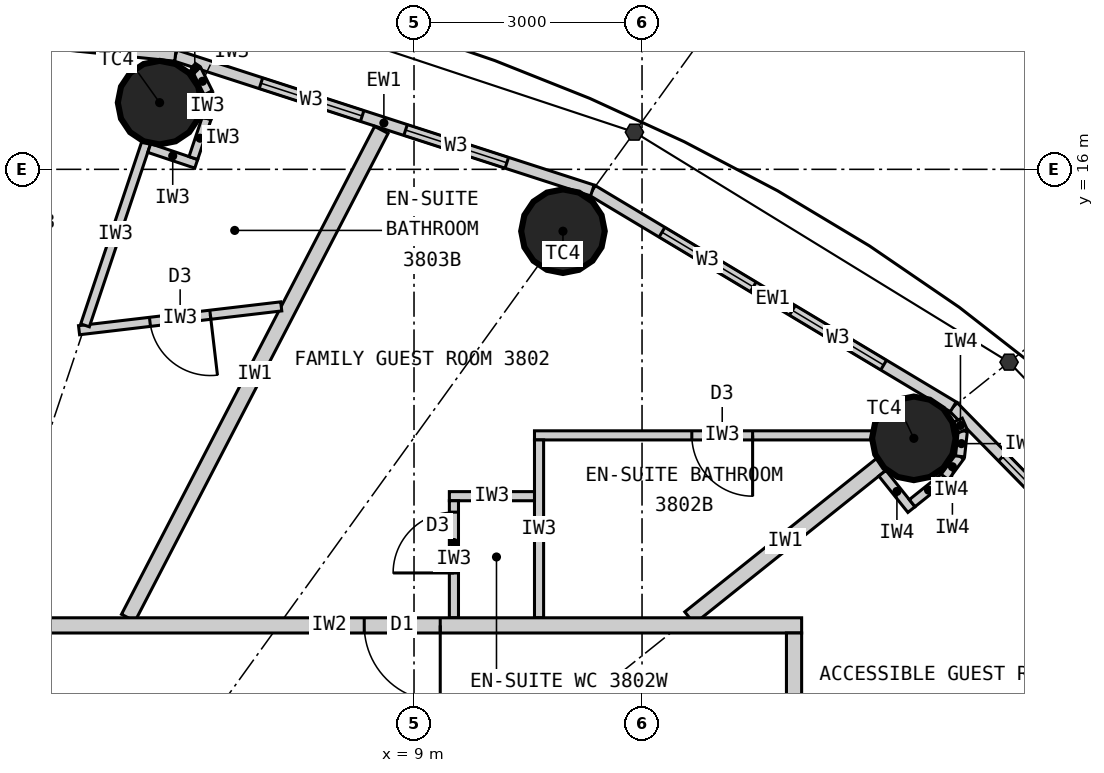
"""IFC4 building model, lengths in metres.
Left out: names, types, materials, properties, quantities, classifications, styles, units other than length and angle.
Written with IfcOpenShell. Run it as: python <this file> out.ifc"""

import sys

from ifc_helpers import new_model, si_unit, direction, frame, frame_2d, origin, origin_2d, place, context, subcontext, project, spatial, rectangle, circle, extrude, element, fill, save


model = new_model("IFC4")
c1 = context("Model", 3, precision=1e-05, world=origin(), true_north=direction((0.0, 1.0)))
c2 = subcontext(c1, "Body", "Model", "MODEL_VIEW")
j1 = project(units=[si_unit("LENGTHUNIT", "METRE"), si_unit("PLANEANGLEUNIT", "RADIAN")], contexts=[c1])
p1 = place(None, origin())
s1 = spatial("IfcSite", under=j1, at=p1, CompositionType="ELEMENT")
p2 = place(p1, origin())
s2 = spatial("IfcBuilding", under=s1, at=p2, CompositionType="ELEMENT")
p3 = place(p2, frame((0.0, 0.0, 146.7)))
s3 = spatial("IfcBuildingStorey", under=s2, at=p3, CompositionType="ELEMENT", Elevation=146.7)
for number, where, z_axis, x_axis in (
    (1, (15.576, 12.461, 0.0), (0.0, 0.0, 1.0), (1.0, 0.0, 0.0)),
    (2, (10.96, 15.186, 0.0), (0.0, 0.0, 1.0), (1.0, 0.0, 0.0)),
    (3, (5.653, 16.877, 0.0), (0.0, 0.0, 1.0), (1.0, 0.0, 0.0)),
):
    element("IfcColumn", number, at=place(p3, frame(where, z_axis=z_axis, x_axis=x_axis)), inside=s3, PredefinedType="COLUMN", context=c2, shape_type="SweptSolid", body=[
        extrude(circle(Radius=0.55, at=origin_2d()), origin(), (0.0, 0.0, 1.0), 3.3),
    ])
p4 = place(p3, frame((19.772, 9.132, 0.0), z_axis=(0.0, 0.0, 1.0), x_axis=(-0.700727467776, 0.71342905457, 0.0)))
e4 = element("IfcWall", 4, at=p4, inside=s3, PredefinedType="ELEMENTEDWALL", context=c2, shape_type="SweptSolid", body=[
    extrude(rectangle(XDim=5.247, YDim=0.15, at=frame_2d((2.624, 0.0))), origin(), (0.0, 0.0, 1.0), 3.12),
])
p5 = place(p4, frame((0.924, 0.0, 0.9)))
e5 = element("IfcOpeningElement", 5, at=p5, cuts=e4, PredefinedType="OPENING", context=c2, shape_type="SweptSolid", body=[
    extrude(rectangle(XDim=1.4, YDim=1.9, at=frame_2d((0.7, 0.95))), frame((0.0, 0.085, 0.0), z_axis=(0.0, -1.0, 0.0), x_axis=(1.0, 0.0, 0.0)), (0.0, 0.0, 1.0), 0.17),
])
p6 = place(p4, frame((2.924, 0.0, 0.9)))
e6 = element("IfcOpeningElement", 6, at=p6, cuts=e4, PredefinedType="OPENING", context=c2, shape_type="SweptSolid", body=[
    extrude(rectangle(XDim=1.4, YDim=1.9, at=frame_2d((0.7, 0.95))), frame((0.0, 0.085, 0.0), z_axis=(0.0, -1.0, 0.0), x_axis=(1.0, 0.0, 0.0)), (0.0, 0.0, 1.0), 0.17),
])
p7 = place(p3, frame((16.095, 12.876, 0.0), z_axis=(0.0, 0.0, 1.0), x_axis=(-0.857695199231, 0.514158482587, 0.0)))
e7 = element("IfcWall", 7, at=p7, inside=s3, PredefinedType="ELEMENTEDWALL", context=c2, shape_type="SweptSolid", body=[
    extrude(rectangle(XDim=5.536, YDim=0.15, at=frame_2d((2.768, 0.0))), origin(), (0.0, 0.0, 1.0), 3.12),
])
p8 = place(p7, frame((1.068, 0.0, 0.9)))
e8 = element("IfcOpeningElement", 8, at=p8, cuts=e7, PredefinedType="OPENING", context=c2, shape_type="SweptSolid", body=[
    extrude(rectangle(XDim=1.4, YDim=1.9, at=frame_2d((0.7, 0.95))), frame((0.0, 0.085, 0.0), z_axis=(0.0, -1.0, 0.0), x_axis=(1.0, 0.0, 0.0)), (0.0, 0.0, 1.0), 0.17),
])
p9 = place(p7, frame((3.068, 0.0, 0.9)))
e9 = element("IfcOpeningElement", 9, at=p9, cuts=e7, PredefinedType="OPENING", context=c2, shape_type="SweptSolid", body=[
    extrude(rectangle(XDim=1.4, YDim=1.9, at=frame_2d((0.7, 0.95))), frame((0.0, 0.085, 0.0), z_axis=(0.0, -1.0, 0.0), x_axis=(1.0, 0.0, 0.0)), (0.0, 0.0, 1.0), 0.17),
])
p10 = place(p3, frame((11.346, 15.722, 0.0), z_axis=(0.0, 0.0, 1.0), x_axis=(-0.951432482129, 0.307857486429, 0.0)))
e10 = element("IfcWall", 10, at=p10, inside=s3, PredefinedType="ELEMENTEDWALL", context=c2, shape_type="SweptSolid", body=[
    extrude(rectangle(XDim=5.766, YDim=0.15, at=frame_2d((2.883, 0.0))), origin(), (0.0, 0.0, 1.0), 3.12),
])
p11 = place(p10, frame((1.183, 0.0, 0.9)))
e11 = element("IfcOpeningElement", 11, at=p11, cuts=e10, PredefinedType="OPENING", context=c2, shape_type="SweptSolid", body=[
    extrude(rectangle(XDim=1.4, YDim=1.9, at=frame_2d((0.7, 0.95))), frame((0.0, 0.085, 0.0), z_axis=(0.0, -1.0, 0.0), x_axis=(1.0, 0.0, 0.0)), (0.0, 0.0, 1.0), 0.17),
])
p12 = place(p10, frame((3.183, 0.0, 0.9)))
e12 = element("IfcOpeningElement", 12, at=p12, cuts=e10, PredefinedType="OPENING", context=c2, shape_type="SweptSolid", body=[
    extrude(rectangle(XDim=1.4, YDim=1.9, at=frame_2d((0.7, 0.95))), frame((0.0, 0.085, 0.0), z_axis=(0.0, -1.0, 0.0), x_axis=(1.0, 0.0, 0.0)), (0.0, 0.0, 1.0), 0.17),
])
p13 = place(p3, frame((5.86, 17.497, 0.0), z_axis=(0.0, 0.0, 1.0), x_axis=(-0.994751738032, 0.102318032045, 0.0)))
e13 = element("IfcWall", 13, at=p13, inside=s3, PredefinedType="ELEMENTEDWALL", context=c2, shape_type="SweptSolid", body=[
    extrude(rectangle(XDim=5.891, YDim=0.15, at=frame_2d((2.946, 0.0))), origin(), (0.0, 0.0, 1.0), 3.12),
])
p14 = place(p13, frame((1.246, 0.0, 0.9)))
e14 = element("IfcOpeningElement", 14, at=p14, cuts=e13, PredefinedType="OPENING", context=c2, shape_type="SweptSolid", body=[
    extrude(rectangle(XDim=1.4, YDim=1.9, at=frame_2d((0.7, 0.95))), frame((0.0, 0.085, 0.0), z_axis=(0.0, -1.0, 0.0), x_axis=(1.0, 0.0, 0.0)), (0.0, 0.0, 1.0), 0.17),
])
p15 = place(p13, frame((3.246, 0.0, 0.9)))
e15 = element("IfcOpeningElement", 15, at=p15, cuts=e13, PredefinedType="OPENING", context=c2, shape_type="SweptSolid", body=[
    extrude(rectangle(XDim=1.4, YDim=1.9, at=frame_2d((0.7, 0.95))), frame((0.0, 0.085, 0.0), z_axis=(0.0, -1.0, 0.0), x_axis=(1.0, 0.0, 0.0)), (0.0, 0.0, 1.0), 0.17),
])
p16 = place(p3, frame((12.625, 10.1, 0.0), z_axis=(0.0, 0.0, 1.0), x_axis=(0.780876185034, 0.624685827954, 0.0)))
e16 = element("IfcWall", 16, at=p16, inside=s3, PredefinedType="PARTITIONING", context=c2, shape_type="SweptSolid", body=[
    extrude(rectangle(XDim=3.229, YDim=0.2, at=frame_2d((1.615, 0.0))), origin(), (0.0, 0.0, 1.0), 2.42),
])
p17 = place(p3, frame((5.24, 10.1, 0.0), z_axis=(0.0, 0.0, 1.0), x_axis=(0.460532965373, 0.887642601391, 0.0)))
e17 = element("IfcWall", 17, at=p17, inside=s3, PredefinedType="PARTITIONING", context=c2, shape_type="SweptSolid", body=[
    extrude(rectangle(XDim=7.231, YDim=0.2, at=frame_2d((3.616, 0.0))), origin(), (0.0, 0.0, 1.0), 3.12),
])
p18 = place(p3, frame((15.525, 12.5, 0.0), z_axis=(0.0, 0.0, 1.0), x_axis=(-1.0, 0.0, 0.0)))
e18 = element("IfcWall", 18, at=p18, inside=s3, PredefinedType="PARTITIONING", context=c2, shape_type="SweptSolid", body=[
    extrude(rectangle(XDim=4.94, YDim=0.12, at=frame_2d((2.47, 0.0))), origin(), (0.0, 0.0, 1.0), 3.12),
])
p19 = place(p18, frame((2.07, 0.0, 0.0)))
e19 = element("IfcOpeningElement", 19, at=p19, cuts=e18, PredefinedType="OPENING", context=c2, shape_type="SweptSolid", body=[
    extrude(rectangle(XDim=0.8, YDim=2.1, at=frame_2d((0.4, 1.05))), frame((0.0, 0.07, 0.0), z_axis=(0.0, -1.0, 0.0), x_axis=(1.0, 0.0, 0.0)), (0.0, 0.0, 1.0), 0.14),
])
p20 = place(p3, frame((10.645, 10.1, 0.0), z_axis=(0.0, 0.0, 1.0), x_axis=(0.0, 1.0, 0.0)))
e20 = element("IfcWall", 20, at=p20, inside=s3, PredefinedType="PARTITIONING", context=c2, shape_type="SweptSolid", body=[
    extrude(rectangle(XDim=2.34, YDim=0.12, at=frame_2d((1.17, 0.0))), origin(), (0.0, 0.0, 1.0), 3.12),
])
p21 = place(p3, frame((10.585, 11.7, 0.0), z_axis=(0.0, 0.0, 1.0), x_axis=(-1.0, 0.0, 0.0)))
e21 = element("IfcWall", 21, at=p21, inside=s3, PredefinedType="PARTITIONING", context=c2, shape_type="SweptSolid", body=[
    extrude(rectangle(XDim=1.12, YDim=0.12, at=frame_2d((0.56, 0.0))), origin(), (0.0, 0.0, 1.0), 3.12),
])
p22 = place(p3, frame((9.525, 10.1, 0.0), z_axis=(0.0, 0.0, 1.0), x_axis=(0.0, 1.0, 0.0)))
e22 = element("IfcWall", 22, at=p22, inside=s3, PredefinedType="PARTITIONING", context=c2, shape_type="SweptSolid", body=[
    extrude(rectangle(XDim=1.54, YDim=0.12, at=frame_2d((0.77, 0.0))), origin(), (0.0, 0.0, 1.0), 3.12),
])
p23 = place(p22, frame((0.59, 0.0, 0.0)))
e23 = element("IfcOpeningElement", 23, at=p23, cuts=e22, PredefinedType="OPENING", context=c2, shape_type="SweptSolid", body=[
    extrude(rectangle(XDim=0.8, YDim=2.1, at=frame_2d((0.4, 1.05))), frame((0.0, 0.07, 0.0), z_axis=(0.0, -1.0, 0.0), x_axis=(1.0, 0.0, 0.0)), (0.0, 0.0, 1.0), 0.14),
])
p24 = place(p3, frame((7.253, 14.197, 0.0), z_axis=(0.0, 0.0, 1.0), x_axis=(-0.993128188393, -0.117031625725, 0.0)))
e24 = element("IfcWall", 24, at=p24, inside=s3, PredefinedType="PARTITIONING", context=c2, shape_type="SweptSolid", body=[
    extrude(rectangle(XDim=2.678, YDim=0.12, at=frame_2d((1.339, 0.0))), origin(), (0.0, 0.0, 1.0), 3.12),
])
p25 = place(p24, frame((0.939, 0.0, 0.0)))
e25 = element("IfcOpeningElement", 25, at=p25, cuts=e24, PredefinedType="OPENING", context=c2, shape_type="SweptSolid", body=[
    extrude(rectangle(XDim=0.8, YDim=2.1, at=frame_2d((0.4, 1.05))), frame((0.0, 0.07, 0.0), z_axis=(0.0, -1.0, 0.0), x_axis=(1.0, 0.0, 0.0)), (0.0, 0.0, 1.0), 0.14),
])
p26 = place(p3, frame((4.671, 13.948, 0.0), z_axis=(0.0, 0.0, 1.0), x_axis=(0.317669167093, 0.948201613729, 0.0)))
e26 = element("IfcWall", 26, at=p26, inside=s3, PredefinedType="PARTITIONING", context=c2, shape_type="SweptSolid", body=[
    extrude(rectangle(XDim=2.54, YDim=0.12, at=frame_2d((1.27, 0.0))), origin(), (0.0, 0.0, 1.0), 2.42),
])
p27 = place(p3, frame((5.516, 16.28, 0.0), z_axis=(0.0, 0.0, 1.0), x_axis=(0.948157944392, -0.317799484717, 0.0)))
e27 = element("IfcWall", 27, at=p27, inside=s3, PredefinedType="PARTITIONING", context=c2, shape_type="SweptSolid", body=[
    extrude(rectangle(XDim=0.652, YDim=0.12, at=frame_2d((0.326, 0.0))), origin(), (0.0, 0.0, 1.0), 3.12),
])
p28 = place(p3, frame((6.097, 16.149, 0.0), z_axis=(0.0, 0.0, 1.0), x_axis=(0.317292604854, 0.948327687514, 0.0)))
e28 = element("IfcWall", 28, at=p28, inside=s3, PredefinedType="PARTITIONING", context=c2, shape_type="SweptSolid", body=[
    extrude(rectangle(XDim=0.55, YDim=0.12, at=frame_2d((0.275, 0.0))), origin(), (0.0, 0.0, 1.0), 3.12),
])
for number, where, z_axis, x_axis in (
    (29, (6.271, 16.67, 0.0), (0.0, 0.0, 1.0), (0.061, 0.998, 0.0)),
    (30, (6.292, 17.007, 0.0), (0.0, 0.0, 1.0), (-0.445, 0.895, 0.0)),
):
    element("IfcWall", number, at=place(p3, frame(where, z_axis=z_axis, x_axis=x_axis)), inside=s3, PredefinedType="PARTITIONING", context=c2, shape_type="SweptSolid", body=[
        extrude(rectangle(XDim=0.338, YDim=0.12, at=frame_2d((0.169, 0.0))), origin(), (0.0, 0.0, 1.0), 3.12),
    ])
p29 = place(p3, frame((6.142, 17.31, 0.0), z_axis=(0.0, 0.0, 1.0), x_axis=(-0.835039693181, 0.550189704386, 0.0)))
e31 = element("IfcWall", 31, at=p29, inside=s3, PredefinedType="PARTITIONING", context=c2, shape_type="SweptSolid", body=[
    extrude(rectangle(XDim=0.062, YDim=0.12, at=frame_2d((0.031, 0.0))), origin(), (0.0, 0.0, 1.0), 3.12),
])
p30 = place(p3, frame((1.67, 10.0, 0.0), z_axis=(0.0, 0.0, 1.0), x_axis=(1.0, 0.0, 0.0)))
e32 = element("IfcWall", 32, at=p30, inside=s3, PredefinedType="PARTITIONING", context=c2, shape_type="SweptSolid", body=[
    extrude(rectangle(XDim=12.43, YDim=0.2, at=frame_2d((6.215, 0.0))), origin(), (0.0, 0.0, 1.0), 3.12),
])
p31 = place(p30, frame((6.675, 0.0, 0.0)))
e33 = element("IfcOpeningElement", 33, at=p31, cuts=e32, PredefinedType="OPENING", context=c2, shape_type="SweptSolid", body=[
    extrude(rectangle(XDim=1.0, YDim=2.2, at=frame_2d((0.5, 1.1))), frame((0.0, 0.11, 0.0), z_axis=(0.0, -1.0, 0.0), x_axis=(1.0, 0.0, 0.0)), (0.0, 0.0, 1.0), 0.22),
])
p32 = place(p3, frame((14.0, 1.67, 0.0), z_axis=(0.0, 0.0, 1.0), x_axis=(0.0, 1.0, 0.0)))
e34 = element("IfcWall", 34, at=p32, inside=s3, PredefinedType="PARTITIONING", context=c2, shape_type="SweptSolid", body=[
    extrude(rectangle(XDim=8.23, YDim=0.2, at=frame_2d((4.115, 0.0))), origin(), (0.0, 0.0, 1.0), 3.12),
])
p33 = place(p32, frame((5.552, 0.0, 0.0)))
e35 = element("IfcOpeningElement", 35, at=p33, cuts=e34, PredefinedType="OPENING", context=c2, shape_type="SweptSolid", body=[
    extrude(rectangle(XDim=1.0, YDim=2.2, at=frame_2d((0.5, 1.1))), frame((0.0, 0.11, 0.0), z_axis=(0.0, -1.0, 0.0), x_axis=(1.0, 0.0, 0.0)), (0.0, 0.0, 1.0), 0.22),
])
p34 = place(p3, frame((15.162, 12.002, 0.0), z_axis=(0.0, 0.0, 1.0), x_axis=(0.624597762427, -0.780946627607, 0.0)))
e36 = element("IfcWall", 36, at=p34, inside=s3, PredefinedType="PARTITIONING", context=c2, shape_type="SweptSolid", body=[
    extrude(rectangle(XDim=0.612, YDim=0.12, at=frame_2d((0.306, 0.0))), origin(), (0.0, 0.0, 1.0), 3.12),
])
p35 = place(p3, frame((15.554, 11.608, 0.0), z_axis=(0.0, 0.0, 1.0), x_axis=(0.780695577787, 0.624911525597, 0.0)))
e37 = element("IfcWall", 37, at=p35, inside=s3, PredefinedType="PARTITIONING", context=c2, shape_type="SweptSolid", body=[
    extrude(rectangle(XDim=0.55, YDim=0.12, at=frame_2d((0.275, 0.0))), origin(), (0.0, 0.0, 1.0), 3.12),
])
p36 = place(p3, frame((15.984, 11.952, 0.0), z_axis=(0.0, 0.0, 1.0), x_axis=(0.592335221171, 0.805691619517, 0.0)))
e38 = element("IfcWall", 38, at=p36, inside=s3, PredefinedType="PARTITIONING", context=c2, shape_type="SweptSolid", body=[
    extrude(rectangle(XDim=0.338, YDim=0.12, at=frame_2d((0.169, 0.0))), origin(), (0.0, 0.0, 1.0), 3.12),
])
p37 = place(p3, frame((16.184, 12.224, 0.0), z_axis=(0.0, 0.0, 1.0), x_axis=(0.110669692975, 0.993857242795, 0.0)))
e39 = element("IfcWall", 39, at=p37, inside=s3, PredefinedType="PARTITIONING", context=c2, shape_type="SweptSolid", body=[
    extrude(rectangle(XDim=0.337, YDim=0.12, at=frame_2d((0.169, 0.0))), origin(), (0.0, 0.0, 1.0), 3.12),
])
p38 = place(p3, frame((16.221, 12.559, 0.0), z_axis=(0.0, 0.0, 1.0), x_axis=(-0.401064416249, 0.916049853457, 0.0)))
e40 = element("IfcWall", 40, at=p38, inside=s3, PredefinedType="PARTITIONING", context=c2, shape_type="SweptSolid", body=[
    extrude(rectangle(XDim=0.156, YDim=0.12, at=frame_2d((0.078, 0.0))), origin(), (0.0, 0.0, 1.0), 3.12),
])
p39 = place(p6, origin())
e41 = element("IfcWindow", 41, at=p39, inside=s3, PartitioningType="SINGLE_PANEL", PredefinedType="WINDOW", context=c2, shape_type="SweptSolid", body=[
    extrude(rectangle(XDim=1.4, YDim=1.9, at=frame_2d((0.7, 0.95))), frame((0.0, 0.03, 0.0), z_axis=(0.0, -1.0, 0.0), x_axis=(1.0, 0.0, 0.0)), (0.0, 0.0, 1.0), 0.06),
])
fill(e6, e41)
p40 = place(p8, origin())
e42 = element("IfcWindow", 42, at=p40, inside=s3, PartitioningType="SINGLE_PANEL", PredefinedType="WINDOW", context=c2, shape_type="SweptSolid", body=[
    extrude(rectangle(XDim=1.4, YDim=1.9, at=frame_2d((0.7, 0.95))), frame((0.0, 0.03, 0.0), z_axis=(0.0, -1.0, 0.0), x_axis=(1.0, 0.0, 0.0)), (0.0, 0.0, 1.0), 0.06),
])
fill(e8, e42)
p41 = place(p9, origin())
e43 = element("IfcWindow", 43, at=p41, inside=s3, PartitioningType="SINGLE_PANEL", PredefinedType="WINDOW", context=c2, shape_type="SweptSolid", body=[
    extrude(rectangle(XDim=1.4, YDim=1.9, at=frame_2d((0.7, 0.95))), frame((0.0, 0.03, 0.0), z_axis=(0.0, -1.0, 0.0), x_axis=(1.0, 0.0, 0.0)), (0.0, 0.0, 1.0), 0.06),
])
fill(e9, e43)
p42 = place(p11, origin())
e44 = element("IfcWindow", 44, at=p42, inside=s3, PartitioningType="SINGLE_PANEL", PredefinedType="WINDOW", context=c2, shape_type="SweptSolid", body=[
    extrude(rectangle(XDim=1.4, YDim=1.9, at=frame_2d((0.7, 0.95))), frame((0.0, 0.03, 0.0), z_axis=(0.0, -1.0, 0.0), x_axis=(1.0, 0.0, 0.0)), (0.0, 0.0, 1.0), 0.06),
])
fill(e11, e44)
p43 = place(p12, origin())
e45 = element("IfcWindow", 45, at=p43, inside=s3, PartitioningType="SINGLE_PANEL", PredefinedType="WINDOW", context=c2, shape_type="SweptSolid", body=[
    extrude(rectangle(XDim=1.4, YDim=1.9, at=frame_2d((0.7, 0.95))), frame((0.0, 0.03, 0.0), z_axis=(0.0, -1.0, 0.0), x_axis=(1.0, 0.0, 0.0)), (0.0, 0.0, 1.0), 0.06),
])
fill(e12, e45)
p44 = place(p19, origin())
e46 = element("IfcDoor", 46, at=p44, inside=s3, OperationType="SINGLE_SWING_LEFT", PredefinedType="DOOR", context=c2, shape_type="SweptSolid", body=[
    extrude(rectangle(XDim=0.8, YDim=2.1, at=frame_2d((0.4, 1.05))), frame((0.0, 0.025, 0.0), z_axis=(0.0, -1.0, 0.0), x_axis=(1.0, 0.0, 0.0)), (0.0, 0.0, 1.0), 0.05),
])
fill(e19, e46)
p45 = place(p23, origin())
e47 = element("IfcDoor", 47, at=p45, inside=s3, OperationType="SINGLE_SWING_LEFT", PredefinedType="DOOR", context=c2, shape_type="SweptSolid", body=[
    extrude(rectangle(XDim=0.8, YDim=2.1, at=frame_2d((0.4, 1.05))), frame((0.0, 0.025, 0.0), z_axis=(0.0, -1.0, 0.0), x_axis=(1.0, 0.0, 0.0)), (0.0, 0.0, 1.0), 0.05),
])
fill(e23, e47)
p46 = place(p31, origin())
e48 = element("IfcDoor", 48, at=p46, inside=s3, OperationType="SINGLE_SWING_RIGHT", PredefinedType="DOOR", context=c2, shape_type="SweptSolid", body=[
    extrude(rectangle(XDim=1.0, YDim=2.2, at=frame_2d((0.5, 1.1))), frame((0.0, 0.025, 0.0), z_axis=(0.0, -1.0, 0.0), x_axis=(1.0, 0.0, 0.0)), (0.0, 0.0, 1.0), 0.05),
])
fill(e33, e48)
p47 = place(p25, origin())
e49 = element("IfcDoor", 49, at=p47, inside=s3, OperationType="SINGLE_SWING_LEFT", PredefinedType="DOOR", context=c2, shape_type="SweptSolid", body=[
    extrude(rectangle(XDim=0.8, YDim=2.1, at=frame_2d((0.4, 1.05))), frame((0.0, 0.025, 0.0), z_axis=(0.0, -1.0, 0.0), x_axis=(1.0, 0.0, 0.0)), (0.0, 0.0, 1.0), 0.05),
])
fill(e25, e49)
save(model, sys.argv[1])
